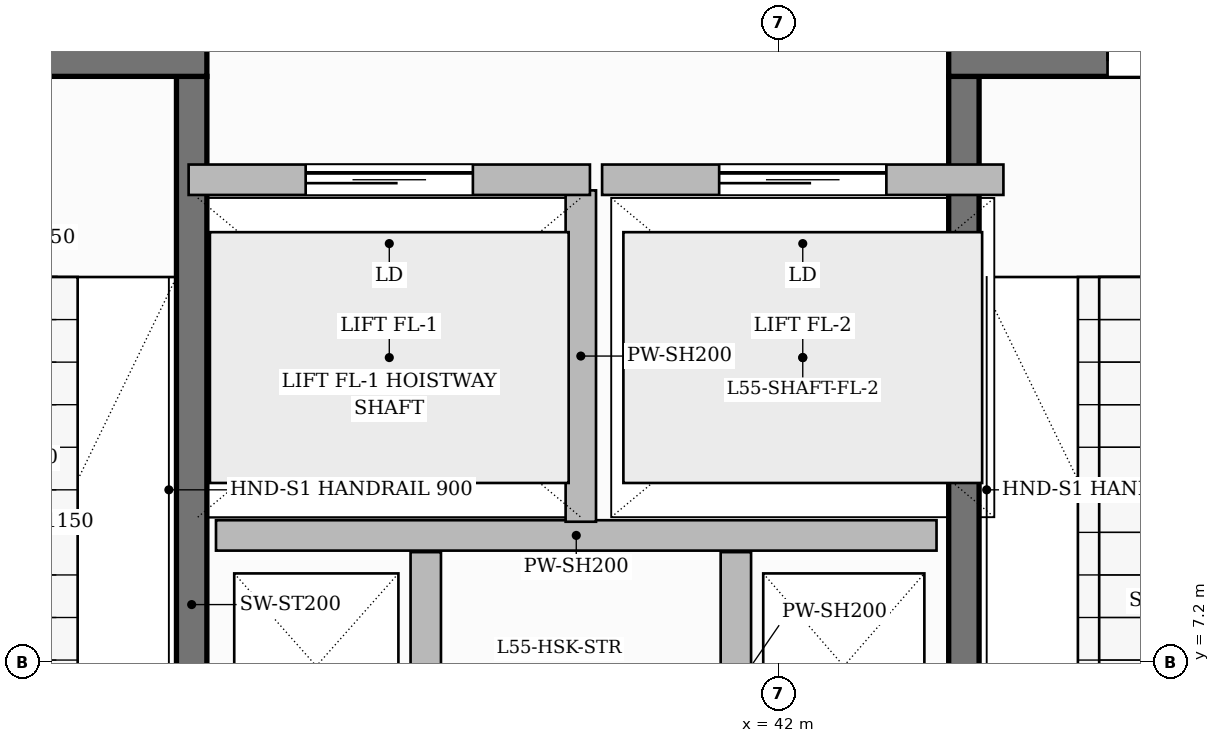
"""IFC4 building model, lengths in metres.
Left out: names, types, materials, properties, quantities, classifications, styles, units other than length and angle.
Written with IfcOpenShell. Run it as: python <this file> out.ifc"""

import sys

from ifc_helpers import new_model, si_unit, direction, frame, frame_2d, origin, place, context, subcontext, project, spatial, rectangle, extrude, source, transform, mapped, element, fill, save


model = new_model("IFC4")
c1 = context("Model", 3, precision=1e-05, world=origin(), true_north=direction((0.0, 1.0)))
c2 = subcontext(c1, "Body", "Model", "MODEL_VIEW")
j1 = project(units=[si_unit("LENGTHUNIT", "METRE"), si_unit("PLANEANGLEUNIT", "RADIAN")], contexts=[c1])
p1 = place(None, origin())
s1 = spatial("IfcSite", under=j1, at=p1, CompositionType="ELEMENT")
p2 = place(p1, origin())
s2 = spatial("IfcBuilding", under=s1, at=p2, CompositionType="ELEMENT")
p3 = place(p2, frame((0.0, 0.0, 145.1)))
s3 = spatial("IfcBuildingStorey", under=s2, at=p3, CompositionType="ELEMENT", Elevation=145.1)
p4 = place(p3, frame((38.14, 4.1, 0.0), z_axis=(0.0, 0.0, 1.0), x_axis=(0.0, 1.0, 0.0)))
e1 = element("IfcWall", 1, at=p4, inside=s3, PredefinedType="SHEAR", context=c2, shape_type="SweptSolid", body=[
    extrude(rectangle(XDim=6.95, YDim=0.2, at=frame_2d((3.475, 0.0))), origin(), (0.0, 0.0, 1.0), 5.2),
])
p5 = place(p3, frame((35.05, 11.15, 0.0), z_axis=(0.0, 0.0, 1.0), x_axis=(1.0, 0.0, 0.0)))
e2 = element("IfcWall", 2, at=p5, inside=s3, PredefinedType="SHEAR", context=c2, shape_type="SweptSolid", body=[
    extrude(rectangle(XDim=3.19, YDim=0.2, at=frame_2d((1.595, 0.0))), origin(), (0.0, 0.0, 1.0), 5.2),
])
p6 = place(p5, frame((1.095, 0.0, 0.0)))
e3 = element("IfcOpeningElement", 3, at=p6, cuts=e2, PredefinedType="OPENING", context=c2, shape_type="SweptSolid", body=[
    extrude(rectangle(XDim=1.05, YDim=2.2, at=frame_2d((0.525, 1.1))), frame((0.0, 0.11, 0.0), z_axis=(0.0, -1.0, 0.0), x_axis=(1.0, 0.0, 0.0)), (0.0, 0.0, 1.0), 0.22),
])
p7 = place(p3, frame((43.22, 4.1, 0.0), z_axis=(0.0, 0.0, 1.0), x_axis=(0.0, 1.0, 0.0)))
e4 = element("IfcWall", 4, at=p7, inside=s3, PredefinedType="SHEAR", context=c2, shape_type="SweptSolid", body=[
    extrude(rectangle(XDim=6.95, YDim=0.2, at=frame_2d((3.475, 0.0))), origin(), (0.0, 0.0, 1.0), 5.2),
])
p8 = place(p3, frame((43.12, 11.15, 0.0), z_axis=(0.0, 0.0, 1.0), x_axis=(1.0, 0.0, 0.0)))
e5 = element("IfcWall", 5, at=p8, inside=s3, PredefinedType="SHEAR", context=c2, shape_type="SweptSolid", body=[
    extrude(rectangle(XDim=6.43, YDim=0.2, at=frame_2d((3.215, 0.0))), origin(), (0.0, 0.0, 1.0), 5.2),
])
p9 = place(p8, frame((1.045, 0.0, 0.0)))
e6 = element("IfcOpeningElement", 6, at=p9, cuts=e5, PredefinedType="OPENING", context=c2, shape_type="SweptSolid", body=[
    extrude(rectangle(XDim=1.05, YDim=2.2, at=frame_2d((0.525, 1.1))), frame((0.0, 0.11, 0.0), z_axis=(0.0, -1.0, 0.0), x_axis=(1.0, 0.0, 0.0)), (0.0, 0.0, 1.0), 0.22),
])
p10 = place(p8, frame((4.125, 0.0, 0.0)))
e7 = element("IfcOpeningElement", 7, at=p10, cuts=e5, PredefinedType="OPENING", context=c2, shape_type="SweptSolid", body=[
    extrude(rectangle(XDim=1.05, YDim=2.2, at=frame_2d((0.525, 1.1))), frame((0.0, 0.11, 0.0), z_axis=(0.0, -1.0, 0.0), x_axis=(1.0, 0.0, 0.0)), (0.0, 0.0, 1.0), 0.22),
])
p11 = place(p3, frame((38.3, 8.03, 0.0), z_axis=(0.0, 0.0, 1.0), x_axis=(1.0, 0.0, 0.0)))
e8 = element("IfcWall", 8, at=p11, inside=s3, PredefinedType="PARTITIONING", context=c2, shape_type="SweptSolid", body=[
    extrude(rectangle(XDim=4.74, YDim=0.2, at=frame_2d((2.37, 0.0))), origin(), (0.0, 0.0, 1.0), 4.95),
])
p12 = place(p3, frame((40.7, 8.12, 0.0), z_axis=(0.0, 0.0, 1.0), x_axis=(0.0, 1.0, 0.0)))
e9 = element("IfcWall", 9, at=p12, inside=s3, PredefinedType="PARTITIONING", context=c2, shape_type="SweptSolid", body=[
    extrude(rectangle(XDim=2.18, YDim=0.2, at=frame_2d((1.09, 0.0))), origin(), (0.0, 0.0, 1.0), 4.95),
])
for number, where, z_axis, x_axis in (
    (10, (39.68, 6.13, 0.0), (0.0, 0.0, 1.0), (0.0, 1.0, 0.0)),
    (11, (41.72, 6.13, 0.0), (0.0, 0.0, 1.0), (0.0, 1.0, 0.0)),
):
    element("IfcWall", number, at=place(p3, frame(where, z_axis=z_axis, x_axis=x_axis)), inside=s3, PredefinedType="PARTITIONING", context=c2, shape_type="SweptSolid", body=[
        extrude(rectangle(XDim=1.79, YDim=0.2, at=frame_2d((0.895, 0.0))), origin(), (0.0, 0.0, 1.0), 4.95),
    ])
p13 = place(p3, frame((41.15, 3.87, 0.0), z_axis=(0.0, 0.0, 1.0), x_axis=(0.0, 1.0, 0.0)))
e12 = element("IfcWall", 12, at=p13, inside=s3, PredefinedType="PARTITIONING", context=c2, shape_type="SweptSolid", body=[
    extrude(rectangle(XDim=4.04, YDim=0.14, at=frame_2d((2.02, 0.0))), origin(), (0.0, 0.0, 1.0), 4.95),
])
p14 = place(p3, frame((38.12, 10.37, 0.0), z_axis=(0.0, 0.0, 1.0), x_axis=(1.0, 0.0, 0.0)))
e13 = element("IfcWall", 13, at=p14, inside=s3, PredefinedType="PARTITIONING", context=c2, shape_type="SweptSolid", body=[
    extrude(rectangle(XDim=2.64, YDim=0.2, at=frame_2d((1.32, 0.0))), origin(), (0.0, 0.0, 1.0), 4.95),
])
p15 = place(p14, frame((0.77, 0.0, 0.0)))
e14 = element("IfcOpeningElement", 14, at=p15, cuts=e13, PredefinedType="OPENING", context=c2, shape_type="SweptSolid", body=[
    extrude(rectangle(XDim=1.1, YDim=2.2, at=frame_2d((0.55, 1.1))), frame((0.0, 0.11, 0.0), z_axis=(0.0, -1.0, 0.0), x_axis=(1.0, 0.0, 0.0)), (0.0, 0.0, 1.0), 0.22),
])
p16 = place(p3, frame((40.84, 10.37, 0.0), z_axis=(0.0, 0.0, 1.0), x_axis=(1.0, 0.0, 0.0)))
e15 = element("IfcWall", 15, at=p16, inside=s3, PredefinedType="PARTITIONING", context=c2, shape_type="SweptSolid", body=[
    extrude(rectangle(XDim=2.64, YDim=0.2, at=frame_2d((1.32, 0.0))), origin(), (0.0, 0.0, 1.0), 4.95),
])
p17 = place(p16, frame((0.77, 0.0, 0.0)))
e16 = element("IfcOpeningElement", 16, at=p17, cuts=e15, PredefinedType="OPENING", context=c2, shape_type="SweptSolid", body=[
    extrude(rectangle(XDim=1.1, YDim=2.2, at=frame_2d((0.55, 1.1))), frame((0.0, 0.11, 0.0), z_axis=(0.0, -1.0, 0.0), x_axis=(1.0, 0.0, 0.0)), (0.0, 0.0, 1.0), 0.22),
])
m1 = source(origin(), c2, "Body", "SweptSolid", [
    extrude(rectangle(XDim=1.05, YDim=2.2, at=frame_2d((0.525, 1.1))), frame((0.0, 0.025, 0.0), z_axis=(0.0, -1.0, 0.0), x_axis=(1.0, 0.0, 0.0)), (0.0, 0.0, 1.0), 0.05),
])
p18 = place(p9, origin())
e17 = element("IfcDoor", 17, at=p18, inside=s3, OperationType="SINGLE_SWING_RIGHT", PredefinedType="DOOR", context=c2, shape_type="MappedRepresentation", body=[
    mapped(m1, transform((0.0, 0.0, 0.0), scale=1.0)),
])
fill(e6, e17)
m2 = source(origin(), c2, "Body", "SweptSolid", [
    extrude(rectangle(XDim=1.1, YDim=2.2, at=frame_2d((0.55, 1.1))), frame((0.0, 0.025, 0.0), z_axis=(0.0, -1.0, 0.0), x_axis=(1.0, 0.0, 0.0)), (0.0, 0.0, 1.0), 0.05),
])
p19 = place(p15, origin())
e18 = element("IfcDoor", 18, at=p19, inside=s3, OperationType="SLIDING_TO_LEFT", PredefinedType="DOOR", context=c2, shape_type="MappedRepresentation", body=[
    mapped(m2, transform((0.0, 0.0, 0.0), scale=1.0)),
])
fill(e14, e18)
p20 = place(p17, origin())
e19 = element("IfcDoor", 19, at=p20, inside=s3, OperationType="SLIDING_TO_LEFT", PredefinedType="DOOR", context=c2, shape_type="MappedRepresentation", body=[
    mapped(m2, transform((0.0, 0.0, 0.0), scale=1.0)),
])
fill(e16, e19)
save(model, sys.argv[1])
